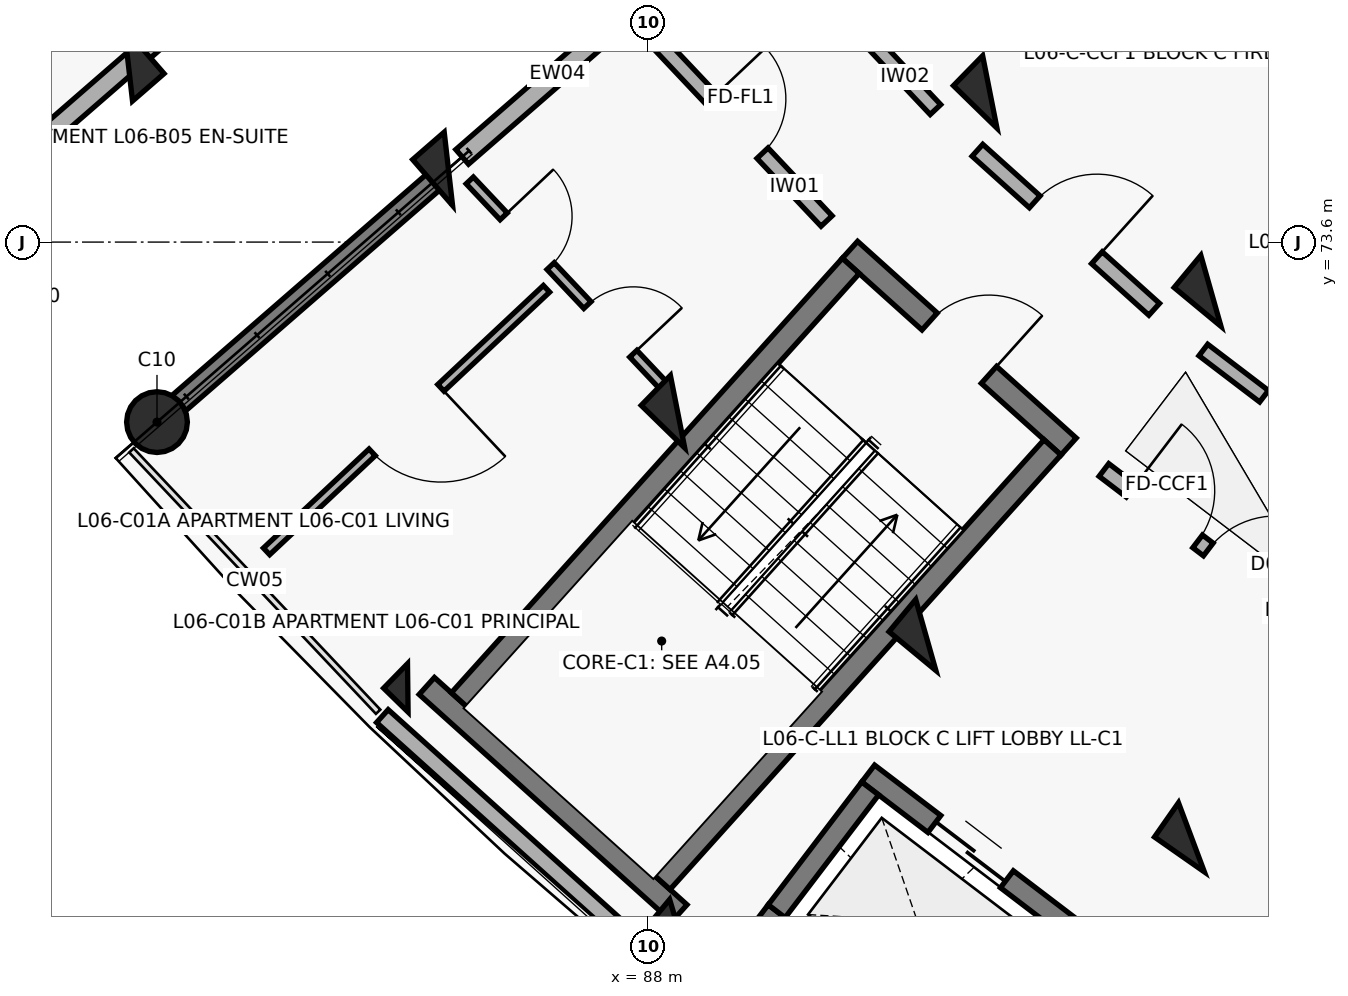
"""IFC4 building model, lengths in metres.
Left out: names, types, materials, properties, quantities, classifications, styles, units other than length and angle.
Written with IfcOpenShell. Run it as: python <this file> out.ifc"""

import sys

from ifc_helpers import new_model, si_unit, direction, frame, frame_2d, origin, origin_2d, place, context, subcontext, project, spatial, rectangle, circle, extrude, element, fill, save


model = new_model("IFC4")
c1 = context("Model", 3, precision=1e-05, world=origin(), true_north=direction((0.0, 1.0)))
c2 = subcontext(c1, "Body", "Model", "MODEL_VIEW")
j1 = project(units=[si_unit("LENGTHUNIT", "METRE"), si_unit("PLANEANGLEUNIT", "RADIAN")], contexts=[c1])
p1 = place(None, origin())
s1 = spatial("IfcSite", under=j1, at=p1, CompositionType="ELEMENT")
p2 = place(p1, origin())
s2 = spatial("IfcBuilding", under=s1, at=p2, CompositionType="ELEMENT")
p3 = place(p2, frame((0.0, 0.0, 20.5)))
s3 = spatial("IfcBuildingStorey", under=s2, at=p3, CompositionType="ELEMENT", Elevation=20.5)
for number, where, z_axis, x_axis in (
    (1, (81.166, 75.938, 0.0), (0.0, 0.0, 1.0), (0.755, 0.656, 0.0)),
    (2, (85.377, 74.564, 0.0), (0.0, 0.0, 1.0), (-0.755, -0.656, 0.0)),
):
    element("IfcColumn", number, at=place(p3, frame(where, z_axis=z_axis, x_axis=x_axis)), inside=s3, PredefinedType="COLUMN", context=c2, shape_type="SweptSolid", body=[
        extrude(rectangle(XDim=0.55, YDim=0.8, at=origin_2d()), origin(), (0.0, 0.0, 1.0), 3.1),
    ])
p4 = place(p3, frame((81.543, 71.231, 0.0), z_axis=(0.0, 0.0, 1.0), x_axis=(-0.754709580223, -0.656059028991, 0.0)))
e3 = element("IfcColumn", 3, at=p4, inside=s3, PredefinedType="COLUMN", context=c2, shape_type="SweptSolid", body=[
    extrude(circle(Radius=0.4, at=origin_2d()), origin(), (0.0, 0.0, 1.0), 3.1),
])
for number, where, z_axis, x_axis in (
    (4, (92.5, 75.576, 0.0), (0.0, 0.0, 1.0), (-0.699, -0.715, 0.0)),
    (5, (88.392, 71.369, 0.0), (0.0, 0.0, 1.0), (-0.699, -0.715, 0.0)),
):
    element("IfcColumn", number, at=place(p3, frame(where, z_axis=z_axis, x_axis=x_axis)), inside=s3, PredefinedType="COLUMN", context=c2, shape_type="SweptSolid", body=[
        extrude(rectangle(XDim=0.55, YDim=0.8, at=origin_2d()), origin(), (0.0, 0.0, 1.0), 3.1),
    ])
p5 = place(p3, frame((84.843, 67.734, 0.0), z_axis=(0.0, 0.0, 1.0), x_axis=(-0.698665066769, -0.715448897181, 0.0)))
e6 = element("IfcColumn", 6, at=p5, inside=s3, PredefinedType="COLUMN", context=c2, shape_type="SweptSolid", body=[
    extrude(rectangle(XDim=0.45, YDim=0.45, at=origin_2d()), origin(), (0.0, 0.0, 1.0), 3.1),
])
for number, where, z_axis, x_axis in (
    (7, (95.409, 72.958, 0.0), (0.0, 0.0, 1.0), (-0.638, -0.77, 0.0)),
    (8, (91.658, 68.43, 0.0), (0.0, 0.0, 1.0), (-0.638, -0.77, 0.0)),
):
    element("IfcColumn", number, at=place(p3, frame(where, z_axis=z_axis, x_axis=x_axis)), inside=s3, PredefinedType="COLUMN", context=c2, shape_type="SweptSolid", body=[
        extrude(rectangle(XDim=0.55, YDim=0.8, at=origin_2d()), origin(), (0.0, 0.0, 1.0), 3.1),
    ])
p6 = place(p3, frame((88.417, 64.518, 0.0), z_axis=(0.0, 0.0, 1.0), x_axis=(-0.637961754089, -0.770068049148, 0.0)))
e9 = element("IfcColumn", 9, at=p6, inside=s3, PredefinedType="COLUMN", context=c2, shape_type="SweptSolid", body=[
    extrude(rectangle(XDim=0.5, YDim=0.75, at=origin_2d()), origin(), (0.0, 0.0, 1.0), 3.1),
])
p7 = place(p3, frame((95.152, 65.768, 0.0), z_axis=(0.0, 0.0, 1.0), x_axis=(-0.573004420611, -0.819552276527, 0.0)))
e10 = element("IfcColumn", 10, at=p7, inside=s3, PredefinedType="COLUMN", context=c2, shape_type="SweptSolid", body=[
    extrude(rectangle(XDim=0.55, YDim=0.8, at=origin_2d()), origin(), (0.0, 0.0, 1.0), 3.1),
])
p8 = place(p3, frame((85.241, 74.446, 0.0), z_axis=(0.0, 0.0, 1.0), x_axis=(-0.754703505217, -0.65606601742, 0.0)))
e11 = element("IfcWall", 11, at=p8, inside=s3, PredefinedType="SHEAR", context=c2, shape_type="SweptSolid", body=[
    extrude(rectangle(XDim=4.72, YDim=0.27, at=frame_2d((2.36, 0.0))), origin(), (0.0, 0.0, 1.0), 2.86),
])
p9 = place(p3, frame((79.234, 74.259, 0.0), z_axis=(0.0, 0.0, 1.0), x_axis=(0.754717680958, 0.656049710044, 0.0)))
e12 = element("IfcWall", 12, at=p9, inside=s3, PredefinedType="SOLIDWALL", context=c2, shape_type="SweptSolid", body=[
    extrude(rectangle(XDim=8.2, YDim=0.255, at=frame_2d((4.1, 0.0))), origin(), (0.0, 0.0, 1.0), 2.18),
])
p10 = place(p9, frame((3.59, 0.0, 0.75)))
e13 = element("IfcOpeningElement", 13, at=p10, cuts=e12, PredefinedType="OPENING", context=c2, shape_type="SweptSolid", body=[
    extrude(rectangle(XDim=1.35, YDim=1.35, at=frame_2d((0.675, 0.675))), frame((0.0, 0.137, 0.0), z_axis=(0.0, -1.0, 0.0), x_axis=(1.0, 0.0, 0.0)), (0.0, 0.0, 1.0), 0.275),
])
p11 = place(p3, frame((84.508, 67.363, 0.0), z_axis=(0.0, 0.0, 1.0), x_axis=(0.743387539862, -0.668860946369, 0.0)))
e14 = element("IfcWall", 14, at=p11, inside=s3, PredefinedType="SOLIDWALL", context=c2, shape_type="SweptSolid", body=[
    extrude(rectangle(XDim=4.809, YDim=0.228, at=frame_2d((2.405, 0.0))), origin(), (0.0, 0.0, 1.0), 2.25),
])
p12 = place(p3, frame((94.82, 77.923, 0.0), z_axis=(0.0, 0.0, 1.0), x_axis=(0.743385092197, -0.668863666751, 0.0)))
e15 = element("IfcWall", 15, at=p12, inside=s3, PredefinedType="SOLIDWALL", context=c2, shape_type="SweptSolid", body=[
    extrude(rectangle(XDim=3.604, YDim=0.23, at=frame_2d((1.802, 0.0))), origin(), (0.0, 0.0, 1.0), 2.25),
])
p13 = place(p12, frame((1.002, 0.0, 0.32)))
e16 = element("IfcOpeningElement", 16, at=p13, cuts=e15, PredefinedType="OPENING", context=c2, shape_type="SweptSolid", body=[
    extrude(rectangle(XDim=1.6, YDim=1.5, at=frame_2d((0.8, 0.75))), frame((0.0, 0.125, 0.0), z_axis=(0.0, -1.0, 0.0), x_axis=(1.0, 0.0, 0.0)), (0.0, 0.0, 1.0), 0.25),
])
p14 = place(p3, frame((91.746, 80.101, 0.0), z_axis=(0.0, 0.0, 1.0), x_axis=(-0.754704866158, -0.656064451862, 0.0)))
e17 = element("IfcWall", 17, at=p14, inside=s3, PredefinedType="SOLIDWALL", context=c2, shape_type="SweptSolid", body=[
    extrude(rectangle(XDim=8.2, YDim=0.255, at=frame_2d((4.1, 0.0))), origin(), (0.0, 0.0, 1.0), 2.18),
])
p15 = place(p14, frame((3.59, 0.0, 0.75)))
e18 = element("IfcOpeningElement", 18, at=p15, cuts=e17, PredefinedType="OPENING", context=c2, shape_type="SweptSolid", body=[
    extrude(rectangle(XDim=1.35, YDim=1.35, at=frame_2d((0.675, 0.675))), frame((0.0, 0.137, 0.0), z_axis=(0.0, -1.0, 0.0), x_axis=(1.0, 0.0, 0.0)), (0.0, 0.0, 1.0), 0.275),
])
p16 = place(p3, frame((90.66, 73.499, 0.0), z_axis=(0.0, 0.0, 1.0), x_axis=(0.743375696158, -0.668874109501, 0.0)))
e19 = element("IfcWall", 19, at=p16, inside=s3, PredefinedType="SHEAR", context=c2, shape_type="SweptSolid", body=[
    extrude(rectangle(XDim=3.87, YDim=0.3, at=frame_2d((1.935, 0.0))), origin(), (0.0, 0.0, 1.0), 3.1),
])
p17 = place(p16, frame((1.41, 0.0, 0.0)))
e20 = element("IfcOpeningElement", 20, at=p17, cuts=e19, PredefinedType="OPENING", context=c2, shape_type="SweptSolid", body=[
    extrude(rectangle(XDim=1.05, YDim=2.15, at=frame_2d((0.525, 1.075))), frame((0.0, 0.16, 0.0), z_axis=(0.0, -1.0, 0.0), x_axis=(1.0, 0.0, 0.0)), (0.0, 0.0, 1.0), 0.32),
])
p18 = place(p3, frame((85.093, 67.76, 0.0), z_axis=(0.0, 0.0, 1.0), x_axis=(0.743372896184, -0.668877221333, 0.0)))
e21 = element("IfcWall", 21, at=p18, inside=s3, PredefinedType="SHEAR", context=c2, shape_type="SweptSolid", body=[
    extrude(rectangle(XDim=4.47, YDim=0.3, at=frame_2d((2.235, 0.0))), origin(), (0.0, 0.0, 1.0), 3.1),
])
p19 = place(p3, frame((90.671, 73.287, 0.0), z_axis=(0.0, 0.0, 1.0), x_axis=(-0.668885797871, -0.743365179038, 0.0)))
e22 = element("IfcWall", 22, at=p19, inside=s3, PredefinedType="SHEAR", context=c2, shape_type="SweptSolid", body=[
    extrude(rectangle(XDim=7.69, YDim=0.3, at=frame_2d((3.845, 0.0))), origin(), (0.0, 0.0, 1.0), 3.1),
])
p20 = place(p3, frame((93.325, 70.899, 0.0), z_axis=(0.0, 0.0, 1.0), x_axis=(-0.668868253964, -0.743380964808, 0.0)))
e23 = element("IfcWall", 23, at=p20, inside=s3, PredefinedType="SHEAR", context=c2, shape_type="SweptSolid", body=[
    extrude(rectangle(XDim=7.69, YDim=0.3, at=frame_2d((3.845, 0.0))), origin(), (0.0, 0.0, 1.0), 3.1),
])
p21 = place(p3, frame((90.899, 66.607, 0.0), z_axis=(0.0, 0.0, 1.0), x_axis=(0.795439986025, -0.606032365994, 0.0)))
e24 = element("IfcWall", 24, at=p21, inside=s3, PredefinedType="SHEAR", context=c2, shape_type="SweptSolid", body=[
    extrude(rectangle(XDim=3.39, YDim=0.28, at=frame_2d((1.695, 0.0))), origin(), (0.0, 0.0, 1.0), 3.1),
])
p22 = place(p21, frame((1.095, 0.0, 0.0)))
e25 = element("IfcOpeningElement", 25, at=p22, cuts=e24, PredefinedType="OPENING", context=c2, shape_type="SweptSolid", body=[
    extrude(rectangle(XDim=1.2, YDim=2.15, at=frame_2d((0.6, 1.075))), frame((0.0, 0.15, 0.0), z_axis=(0.0, -1.0, 0.0), x_axis=(1.0, 0.0, 0.0)), (0.0, 0.0, 1.0), 0.3),
])
p23 = place(p3, frame((89.5, 64.77, 0.0), z_axis=(0.0, 0.0, 1.0), x_axis=(0.795474703455, -0.605986795371, 0.0)))
e26 = element("IfcWall", 26, at=p23, inside=s3, PredefinedType="SHEAR", context=c2, shape_type="SweptSolid", body=[
    extrude(rectangle(XDim=3.39, YDim=0.28, at=frame_2d((1.695, 0.0))), origin(), (0.0, 0.0, 1.0), 3.1),
])
p24 = place(p3, frame((90.926, 66.411, 0.0), z_axis=(0.0, 0.0, 1.0), x_axis=(-0.605948992168, -0.795503500238, 0.0)))
e27 = element("IfcWall", 27, at=p24, inside=s3, PredefinedType="SHEAR", context=c2, shape_type="SweptSolid", body=[
    extrude(rectangle(XDim=2.03, YDim=0.28, at=frame_2d((1.015, 0.0))), origin(), (0.0, 0.0, 1.0), 3.1),
])
p25 = place(p3, frame((78.163, 75.139, 0.0), z_axis=(0.0, 0.0, 1.0), x_axis=(0.734519733107, 0.678587327967, 0.0)))
e28 = element("IfcWall", 28, at=p25, inside=s3, PredefinedType="PARTITIONING", context=c2, shape_type="SweptSolid", body=[
    extrude(rectangle(XDim=3.3, YDim=0.145, at=frame_2d((1.65, 0.0))), origin(), (0.0, 0.0, 1.0), 2.08),
])
p26 = place(p25, frame((1.21, 0.0, 0.0)))
e29 = element("IfcOpeningElement", 29, at=p26, cuts=e28, PredefinedType="OPENING", context=c2, shape_type="SweptSolid", body=[
    extrude(rectangle(XDim=0.88, YDim=2.1, at=frame_2d((0.44, 1.05))), frame((0.0, 0.083, 0.0), z_axis=(0.0, -1.0, 0.0), x_axis=(1.0, 0.0, 0.0)), (0.0, 0.0, 1.0), 0.165),
])
p27 = place(p3, frame((87.994, 76.376, 0.0), z_axis=(0.0, 0.0, 1.0), x_axis=(0.686310507227, -0.727308660522, 0.0)))
e30 = element("IfcWall", 30, at=p27, inside=s3, PredefinedType="SOLIDWALL", context=c2, shape_type="SweptSolid", body=[
    extrude(rectangle(XDim=3.436, YDim=0.2, at=frame_2d((1.718, 0.0))), origin(), (0.0, 0.0, 1.0), 2.08),
])
p28 = place(p27, frame((1.228, 0.0, 0.0)))
e31 = element("IfcOpeningElement", 31, at=p28, cuts=e30, PredefinedType="OPENING", context=c2, shape_type="SweptSolid", body=[
    extrude(rectangle(XDim=0.98, YDim=2.15, at=frame_2d((0.49, 1.075))), frame((0.0, 0.11, 0.0), z_axis=(0.0, -1.0, 0.0), x_axis=(1.0, 0.0, 0.0)), (0.0, 0.0, 1.0), 0.22),
])
p29 = place(p3, frame((89.541, 77.721, 0.0), z_axis=(0.0, 0.0, 1.0), x_axis=(0.686344941052, -0.727276166179, 0.0)))
e32 = element("IfcWall", 32, at=p29, inside=s3, PredefinedType="SOLIDWALL", context=c2, shape_type="SweptSolid", body=[
    extrude(rectangle(XDim=3.269, YDim=0.19, at=frame_2d((1.634, 0.0))), origin(), (0.0, 0.0, 1.0), 2.08),
])
p30 = place(p29, frame((1.164, 0.0, 0.0)))
e33 = element("IfcOpeningElement", 33, at=p30, cuts=e32, PredefinedType="OPENING", context=c2, shape_type="SweptSolid", body=[
    extrude(rectangle(XDim=0.94, YDim=2.1, at=frame_2d((0.47, 1.05))), frame((0.0, 0.105, 0.0), z_axis=(0.0, -1.0, 0.0), x_axis=(1.0, 0.0, 0.0)), (0.0, 0.0, 1.0), 0.21),
])
p31 = place(p3, frame((85.658, 74.411, 0.0), z_axis=(0.0, 0.0, 1.0), x_axis=(0.686364008772, -0.727258171121, 0.0)))
e34 = element("IfcWall", 34, at=p31, inside=s3, PredefinedType="PARTITIONING", context=c2, shape_type="SweptSolid", body=[
    extrude(rectangle(XDim=3.785, YDim=0.13, at=frame_2d((1.893, 0.0))), origin(), (0.0, 0.0, 1.0), 2.08),
])
p32 = place(p31, frame((0.65, 0.0, 0.0)))
e35 = element("IfcOpeningElement", 35, at=p32, cuts=e34, PredefinedType="OPENING", context=c2, shape_type="SweptSolid", body=[
    extrude(rectangle(XDim=0.9, YDim=2.1, at=frame_2d((0.45, 1.05))), frame((0.0, 0.075, 0.0), z_axis=(0.0, -1.0, 0.0), x_axis=(1.0, 0.0, 0.0)), (0.0, 0.0, 1.0), 0.15),
])
p33 = place(p31, frame((2.255, 0.0, 0.0)))
e36 = element("IfcOpeningElement", 36, at=p33, cuts=e34, PredefinedType="OPENING", context=c2, shape_type="SweptSolid", body=[
    extrude(rectangle(XDim=0.88, YDim=2.1, at=frame_2d((0.44, 1.05))), frame((0.0, 0.075, 0.0), z_axis=(0.0, -1.0, 0.0), x_axis=(1.0, 0.0, 0.0)), (0.0, 0.0, 1.0), 0.15),
])
p34 = place(p3, frame((86.667, 72.985, 0.0), z_axis=(0.0, 0.0, 1.0), x_axis=(-0.72936983679, -0.684119610288, 0.0)))
e37 = element("IfcWall", 37, at=p34, inside=s3, PredefinedType="PARTITIONING", context=c2, shape_type="SweptSolid", body=[
    extrude(rectangle(XDim=5.05, YDim=0.12, at=frame_2d((2.525, 0.0))), origin(), (0.0, 0.0, 1.0), 2.08),
])
p35 = place(p34, frame((1.905, 0.0, 0.0)))
e38 = element("IfcOpeningElement", 38, at=p35, cuts=e37, PredefinedType="OPENING", context=c2, shape_type="SweptSolid", body=[
    extrude(rectangle(XDim=1.24, YDim=2.1, at=frame_2d((0.62, 1.05))), frame((0.0, 0.07, 0.0), z_axis=(0.0, -1.0, 0.0), x_axis=(1.0, 0.0, 0.0)), (0.0, 0.0, 1.0), 0.14),
])
p36 = place(p3, frame((92.337, 74.808, 0.0), z_axis=(0.0, 0.0, 1.0), x_axis=(0.743348465558, -0.668904371904, 0.0)))
e39 = element("IfcWall", 39, at=p36, inside=s3, PredefinedType="SOLIDWALL", context=c2, shape_type="SweptSolid", body=[
    extrude(rectangle(XDim=3.129, YDim=0.21, at=frame_2d((1.564, 0.0))), origin(), (0.0, 0.0, 1.0), 2.08),
])
p37 = place(p36, frame((1.014, 0.0, 0.0)))
e40 = element("IfcOpeningElement", 40, at=p37, cuts=e39, PredefinedType="OPENING", context=c2, shape_type="SweptSolid", body=[
    extrude(rectangle(XDim=1.1, YDim=2.15, at=frame_2d((0.55, 1.075))), frame((0.0, 0.115, 0.0), z_axis=(0.0, -1.0, 0.0), x_axis=(1.0, 0.0, 0.0)), (0.0, 0.0, 1.0), 0.23),
])
p38 = place(p3, frame((94.001, 70.602, 0.0), z_axis=(0.0, 0.0, 1.0), x_axis=(0.795498026433, -0.605956178235, 0.0)))
e41 = element("IfcWall", 41, at=p38, inside=s3, PredefinedType="SOLIDWALL", context=c2, shape_type="SweptSolid", body=[
    extrude(rectangle(XDim=3.296, YDim=0.21, at=frame_2d((1.648, 0.0))), origin(), (0.0, 0.0, 1.0), 2.08),
])
p39 = place(p38, frame((0.45, 0.0, 0.0)))
e42 = element("IfcOpeningElement", 42, at=p39, cuts=e41, PredefinedType="OPENING", context=c2, shape_type="SweptSolid", body=[
    extrude(rectangle(XDim=1.1, YDim=2.15, at=frame_2d((0.55, 1.075))), frame((0.0, 0.115, 0.0), z_axis=(0.0, -1.0, 0.0), x_axis=(1.0, 0.0, 0.0)), (0.0, 0.0, 1.0), 0.23),
])
p40 = place(p38, frame((1.726, 0.0, 0.0)))
e43 = element("IfcOpeningElement", 43, at=p40, cuts=e41, PredefinedType="OPENING", context=c2, shape_type="SweptSolid", body=[
    extrude(rectangle(XDim=1.12, YDim=2.15, at=frame_2d((0.56, 1.075))), frame((0.0, 0.115, 0.0), z_axis=(0.0, -1.0, 0.0), x_axis=(1.0, 0.0, 0.0)), (0.0, 0.0, 1.0), 0.23),
])
p41 = place(p3, frame((95.309, 72.18, 0.0), z_axis=(0.0, 0.0, 1.0), x_axis=(0.795463961918, -0.606000895453, 0.0)))
e44 = element("IfcWall", 44, at=p41, inside=s3, PredefinedType="SOLIDWALL", context=c2, shape_type="SweptSolid", body=[
    extrude(rectangle(XDim=3.129, YDim=0.19, at=frame_2d((1.564, 0.0))), origin(), (0.0, 0.0, 1.0), 2.08),
])
p42 = place(p41, frame((1.004, 0.0, 0.0)))
e45 = element("IfcOpeningElement", 45, at=p42, cuts=e44, PredefinedType="OPENING", context=c2, shape_type="SweptSolid", body=[
    extrude(rectangle(XDim=1.12, YDim=2.15, at=frame_2d((0.56, 1.075))), frame((0.0, 0.105, 0.0), z_axis=(0.0, -1.0, 0.0), x_axis=(1.0, 0.0, 0.0)), (0.0, 0.0, 1.0), 0.21),
])
p43 = place(p3, frame((98.504, 67.072, 0.0), z_axis=(0.0, 0.0, 1.0), x_axis=(-0.540338452216, -0.841447774408, 0.0)))
e46 = element("IfcWall", 46, at=p43, inside=s3, PredefinedType="PARTITIONING", context=c2, shape_type="SweptSolid", body=[
    extrude(rectangle(XDim=7.95, YDim=0.14, at=frame_2d((3.975, 0.0))), origin(), (0.0, 0.0, 1.0), 2.08),
])
p44 = place(p43, frame((6.05, 0.0, 0.0)))
e47 = element("IfcOpeningElement", 47, at=p44, cuts=e46, PredefinedType="OPENING", context=c2, shape_type="SweptSolid", body=[
    extrude(rectangle(XDim=0.92, YDim=2.1, at=frame_2d((0.46, 1.05))), frame((0.0, 0.08, 0.0), z_axis=(0.0, -1.0, 0.0), x_axis=(1.0, 0.0, 0.0)), (0.0, 0.0, 1.0), 0.16),
])
p45 = place(p17, origin())
e48 = element("IfcDoor", 48, at=p45, inside=s3, OperationType="SINGLE_SWING_RIGHT", PredefinedType="DOOR", context=c2, shape_type="SweptSolid", body=[
    extrude(rectangle(XDim=1.05, YDim=2.15, at=frame_2d((0.525, 1.075))), frame((0.0, 0.025, 0.0), z_axis=(0.0, -1.0, 0.0), x_axis=(1.0, 0.0, 0.0)), (0.0, 0.0, 1.0), 0.05),
])
fill(e20, e48)
p46 = place(p22, origin())
e49 = element("IfcDoor", 49, at=p46, inside=s3, OperationType="DOUBLE_DOOR_SLIDING", PredefinedType="DOOR", context=c2, shape_type="SweptSolid", body=[
    extrude(rectangle(XDim=1.2, YDim=2.15, at=frame_2d((0.6, 1.075))), frame((0.0, 0.025, 0.0), z_axis=(0.0, -1.0, 0.0), x_axis=(1.0, 0.0, 0.0)), (0.0, 0.0, 1.0), 0.05),
])
fill(e25, e49)
p47 = place(p28, origin())
e50 = element("IfcDoor", 50, at=p47, inside=s3, OperationType="SINGLE_SWING_LEFT", PredefinedType="DOOR", context=c2, shape_type="SweptSolid", body=[
    extrude(rectangle(XDim=0.98, YDim=2.15, at=frame_2d((0.49, 1.075))), frame((0.0, 0.025, 0.0), z_axis=(0.0, -1.0, 0.0), x_axis=(1.0, 0.0, 0.0)), (0.0, 0.0, 1.0), 0.05),
])
fill(e31, e50)
p48 = place(p32, origin())
e51 = element("IfcDoor", 51, at=p48, inside=s3, OperationType="SINGLE_SWING_LEFT", PredefinedType="DOOR", context=c2, shape_type="SweptSolid", body=[
    extrude(rectangle(XDim=0.9, YDim=2.1, at=frame_2d((0.45, 1.05))), frame((0.0, 0.025, 0.0), z_axis=(0.0, -1.0, 0.0), x_axis=(1.0, 0.0, 0.0)), (0.0, 0.0, 1.0), 0.05),
])
fill(e35, e51)
p49 = place(p33, origin())
e52 = element("IfcDoor", 52, at=p49, inside=s3, OperationType="SINGLE_SWING_RIGHT", PredefinedType="DOOR", context=c2, shape_type="SweptSolid", body=[
    extrude(rectangle(XDim=0.88, YDim=2.1, at=frame_2d((0.44, 1.05))), frame((0.0, 0.025, 0.0), z_axis=(0.0, -1.0, 0.0), x_axis=(1.0, 0.0, 0.0)), (0.0, 0.0, 1.0), 0.05),
])
fill(e36, e52)
p50 = place(p35, origin())
e53 = element("IfcDoor", 53, at=p50, inside=s3, OperationType="SINGLE_SWING_LEFT", PredefinedType="DOOR", context=c2, shape_type="SweptSolid", body=[
    extrude(rectangle(XDim=1.24, YDim=2.1, at=frame_2d((0.62, 1.05))), frame((0.0, 0.025, 0.0), z_axis=(0.0, -1.0, 0.0), x_axis=(1.0, 0.0, 0.0)), (0.0, 0.0, 1.0), 0.05),
])
fill(e38, e53)
p51 = place(p37, origin())
e54 = element("IfcDoor", 54, at=p51, inside=s3, OperationType="SINGLE_SWING_RIGHT", PredefinedType="DOOR", context=c2, shape_type="SweptSolid", body=[
    extrude(rectangle(XDim=1.1, YDim=2.15, at=frame_2d((0.55, 1.075))), frame((0.0, 0.025, 0.0), z_axis=(0.0, -1.0, 0.0), x_axis=(1.0, 0.0, 0.0)), (0.0, 0.0, 1.0), 0.05),
])
fill(e40, e54)
p52 = place(p39, origin())
e55 = element("IfcDoor", 55, at=p52, inside=s3, OperationType="SINGLE_SWING_LEFT", PredefinedType="DOOR", context=c2, shape_type="SweptSolid", body=[
    extrude(rectangle(XDim=1.1, YDim=2.15, at=frame_2d((0.55, 1.075))), frame((0.0, 0.025, 0.0), z_axis=(0.0, -1.0, 0.0), x_axis=(1.0, 0.0, 0.0)), (0.0, 0.0, 1.0), 0.05),
])
fill(e42, e55)
p53 = place(p40, origin())
e56 = element("IfcDoor", 56, at=p53, inside=s3, OperationType="SINGLE_SWING_RIGHT", PredefinedType="DOOR", context=c2, shape_type="SweptSolid", body=[
    extrude(rectangle(XDim=1.12, YDim=2.15, at=frame_2d((0.56, 1.075))), frame((0.0, 0.025, 0.0), z_axis=(0.0, -1.0, 0.0), x_axis=(1.0, 0.0, 0.0)), (0.0, 0.0, 1.0), 0.05),
])
fill(e43, e56)
p54 = place(p42, origin())
e57 = element("IfcDoor", 57, at=p54, inside=s3, OperationType="SINGLE_SWING_LEFT", PredefinedType="DOOR", context=c2, shape_type="SweptSolid", body=[
    extrude(rectangle(XDim=1.12, YDim=2.15, at=frame_2d((0.56, 1.075))), frame((0.0, 0.025, 0.0), z_axis=(0.0, -1.0, 0.0), x_axis=(1.0, 0.0, 0.0)), (0.0, 0.0, 1.0), 0.05),
])
fill(e45, e57)
save(model, sys.argv[1])
